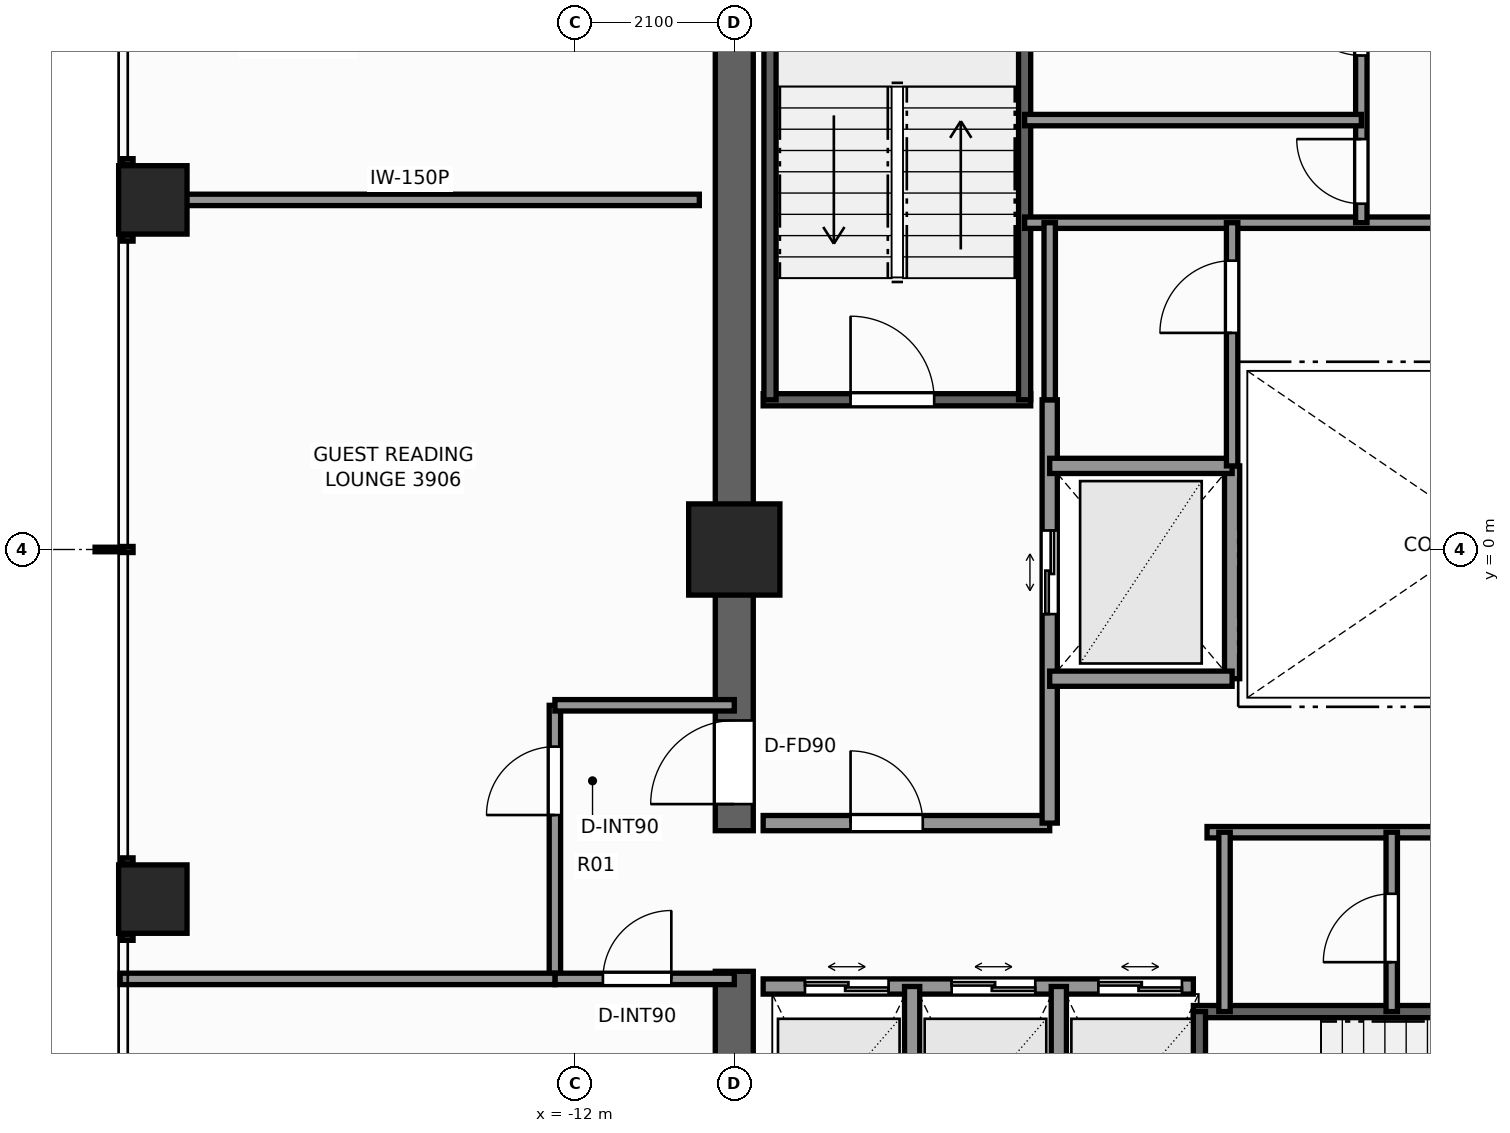
"""IFC4 building model, lengths in metres.
Left out: names, types, materials, properties, quantities, classifications, styles, units other than length and angle.
Written with IfcOpenShell. Run it as: python <this file> out.ifc"""

import sys

from ifc_helpers import new_model, si_unit, direction, frame, frame_2d, origin, origin_2d, place, context, subcontext, project, spatial, rectangle, extrude, element, fill, save


model = new_model("IFC4")
c1 = context("Model", 3, precision=1e-05, world=origin(), true_north=direction((0.0, 1.0)))
c2 = subcontext(c1, "Body", "Model", "MODEL_VIEW")
j1 = project(units=[si_unit("LENGTHUNIT", "METRE"), si_unit("PLANEANGLEUNIT", "RADIAN")], contexts=[c1])
p1 = place(None, origin())
s1 = spatial("IfcSite", under=j1, at=p1, CompositionType="ELEMENT")
p2 = place(p1, origin())
s2 = spatial("IfcBuilding", under=s1, at=p2, CompositionType="ELEMENT")
p3 = place(p2, frame((0.0, 0.0, 134.9)))
s3 = spatial("IfcBuildingStorey", under=s2, at=p3, CompositionType="ELEMENT", Elevation=134.9)
p4 = place(p3, frame((-9.9, -9.65, 0.0), z_axis=(0.0, 0.0, 1.0), x_axis=(0.0, 1.0, 0.0)))
e1 = element("IfcWall", 1, at=p4, inside=s3, PredefinedType="SHEAR", context=c2, shape_type="SweptSolid", body=[
    extrude(rectangle(XDim=4.1, YDim=0.5, at=frame_2d((2.05, 0.0))), origin(), (0.0, 0.0, 1.0), 3.3),
])
p5 = place(p3, frame((-9.9, -3.7, 0.0), z_axis=(0.0, 0.0, 1.0), x_axis=(0.0, 1.0, 0.0)))
e2 = element("IfcWall", 2, at=p5, inside=s3, PredefinedType="SHEAR", context=c2, shape_type="SweptSolid", body=[
    extrude(rectangle(XDim=13.35, YDim=0.5, at=frame_2d((6.675, 0.0))), origin(), (0.0, 0.0, 1.0), 3.3),
])
p6 = place(p5, frame((0.35, 0.0, 0.0)))
e3 = element("IfcOpeningElement", 3, at=p6, cuts=e2, PredefinedType="OPENING", context=c2, shape_type="SweptSolid", body=[
    extrude(rectangle(XDim=1.1, YDim=2.2, at=frame_2d((0.55, 1.1))), frame((0.0, 0.26, 0.0), z_axis=(0.0, -1.0, 0.0), x_axis=(1.0, 0.0, 0.0)), (0.0, 0.0, 1.0), 0.52),
])
p7 = place(p3, frame((-9.9, 0.0, 0.0), z_axis=(0.0, 0.0, 1.0), x_axis=(1.0, 0.0, 0.0)))
e4 = element("IfcColumn", 4, at=p7, inside=s3, PredefinedType="COLUMN", context=c2, shape_type="SweptSolid", body=[
    extrude(rectangle(XDim=1.2, YDim=1.2, at=origin_2d()), origin(), (0.0, 0.0, 1.0), 3.3),
])
for number, where, z_axis, x_axis in (
    (5, (-17.55, -4.6, 0.0), (0.0, 0.0, 1.0), (1.0, 0.0, 0.0)),
    (6, (-17.55, 4.6, 0.0), (0.0, 0.0, 1.0), (1.0, 0.0, 0.0)),
):
    element("IfcColumn", number, at=place(p3, frame(where, z_axis=z_axis, x_axis=x_axis)), inside=s3, PredefinedType="COLUMN", context=c2, shape_type="SweptSolid", body=[
        extrude(rectangle(XDim=0.9, YDim=0.9, at=origin_2d()), origin(), (0.0, 0.0, 1.0), 3.3),
    ])
p8 = place(p3, frame((-9.52, 1.97, 0.0), z_axis=(0.0, 0.0, 1.0), x_axis=(1.0, 0.0, 0.0)))
e7 = element("IfcWall", 7, at=p8, inside=s3, PredefinedType="SHEAR", context=c2, shape_type="SweptSolid", body=[
    extrude(rectangle(XDim=3.52, YDim=0.16, at=frame_2d((1.76, 0.0))), origin(), (0.0, 0.0, 1.0), 3.3),
])
p9 = place(p8, frame((1.15, 0.0, 0.0)))
e8 = element("IfcOpeningElement", 8, at=p9, cuts=e7, PredefinedType="OPENING", context=c2, shape_type="SweptSolid", body=[
    extrude(rectangle(XDim=1.1, YDim=2.2, at=frame_2d((0.55, 1.1))), frame((0.0, 0.09, 0.0), z_axis=(0.0, -1.0, 0.0), x_axis=(1.0, 0.0, 0.0)), (0.0, 0.0, 1.0), 0.18),
])
for number, where, z_axis, x_axis in (
    (9, (-9.43, 1.97, 0.0), (0.0, 0.0, 1.0), (0.0, 1.0, 0.0)),
    (10, (-6.08, 1.97, 0.0), (0.0, 0.0, 1.0), (0.0, 1.0, 0.0)),
):
    element("IfcWall", number, at=place(p3, frame(where, z_axis=z_axis, x_axis=x_axis)), inside=s3, PredefinedType="SHEAR", context=c2, shape_type="SweptSolid", body=[
        extrude(rectangle(XDim=7.56, YDim=0.16, at=frame_2d((3.78, 0.0))), origin(), (0.0, 0.0, 1.0), 3.3),
    ])
p10 = place(p3, frame((-3.86, -6.08, 0.0), z_axis=(0.0, 0.0, 1.0), x_axis=(1.0, 0.0, 0.0)))
e11 = element("IfcWall", 11, at=p10, inside=s3, PredefinedType="SHEAR", context=c2, shape_type="SweptSolid", body=[
    extrude(rectangle(XDim=7.72, YDim=0.16, at=frame_2d((3.86, 0.0))), origin(), (0.0, 0.0, 1.0), 3.3),
])
p11 = place(p3, frame((-3.78, -9.43, 0.0), z_axis=(0.0, 0.0, 1.0), x_axis=(0.0, 1.0, 0.0)))
e12 = element("IfcWall", 12, at=p11, inside=s3, PredefinedType="SHEAR", context=c2, shape_type="SweptSolid", body=[
    extrude(rectangle(XDim=3.35, YDim=0.16, at=frame_2d((1.675, 0.0))), origin(), (0.0, 0.0, 1.0), 3.3),
])
p12 = place(p3, frame((-9.52, -3.6, 0.0), z_axis=(0.0, 0.0, 1.0), x_axis=(1.0, 0.0, 0.0)))
e13 = element("IfcWall", 13, at=p12, inside=s3, PredefinedType="SOLIDWALL", context=c2, shape_type="SweptSolid", body=[
    extrude(rectangle(XDim=3.77, YDim=0.2, at=frame_2d((1.885, 0.0))), origin(), (0.0, 0.0, 1.0), 3.1),
])
p13 = place(p12, frame((1.15, 0.0, 0.0)))
e14 = element("IfcOpeningElement", 14, at=p13, cuts=e13, PredefinedType="OPENING", context=c2, shape_type="SweptSolid", body=[
    extrude(rectangle(XDim=0.95, YDim=2.06, at=frame_2d((0.475, 1.03))), frame((0.0, 0.11, 0.0), z_axis=(0.0, -1.0, 0.0), x_axis=(1.0, 0.0, 0.0)), (0.0, 0.0, 1.0), 0.22),
])
p14 = place(p3, frame((-5.75, -3.6, 0.0), z_axis=(0.0, 0.0, 1.0), x_axis=(0.0, 1.0, 0.0)))
e15 = element("IfcWall", 15, at=p14, inside=s3, PredefinedType="SOLIDWALL", context=c2, shape_type="SweptSolid", body=[
    extrude(rectangle(XDim=5.57, YDim=0.2, at=frame_2d((2.785, 0.0))), origin(), (0.0, 0.0, 1.0), 2.735),
])
p15 = place(p14, frame((2.75, 0.0, 0.0)))
e16 = element("IfcOpeningElement", 16, at=p15, cuts=e15, PredefinedType="OPENING", context=c2, shape_type="SweptSolid", body=[
    extrude(rectangle(XDim=1.1, YDim=2.2, at=frame_2d((0.55, 1.1))), frame((0.0, 0.11, 0.0), z_axis=(0.0, -1.0, 0.0), x_axis=(1.0, 0.0, 0.0)), (0.0, 0.0, 1.0), 0.22),
])
p16 = place(p3, frame((-3.35, -1.7, 0.0), z_axis=(0.0, 0.0, 1.0), x_axis=(0.0, 1.0, 0.0)))
e17 = element("IfcWall", 17, at=p16, inside=s3, PredefinedType="SOLIDWALL", context=c2, shape_type="SweptSolid", body=[
    extrude(rectangle(XDim=2.8, YDim=0.2, at=frame_2d((1.4, 0.0))), origin(), (0.0, 0.0, 1.0), 2.735),
])
for number, where, z_axis, x_axis in (
    (18, (-5.75, -1.7, 0.0), (0.0, 0.0, 1.0), (1.0, 0.0, 0.0)),
    (19, (-5.75, 1.1, 0.0), (0.0, 0.0, 1.0), (1.0, 0.0, 0.0)),
):
    element("IfcWall", number, at=place(p3, frame(where, z_axis=z_axis, x_axis=x_axis)), inside=s3, PredefinedType="SOLIDWALL", context=c2, shape_type="SweptSolid", body=[
        extrude(rectangle(XDim=2.4, YDim=0.2, at=frame_2d((1.2, 0.0))), origin(), (0.0, 0.0, 1.0), 3.1),
    ])
p17 = place(p3, frame((-6.08, 4.3, 0.0), z_axis=(0.0, 0.0, 1.0), x_axis=(1.0, 0.0, 0.0)))
e20 = element("IfcWall", 20, at=p17, inside=s3, PredefinedType="PARTITIONING", context=c2, shape_type="SweptSolid", body=[
    extrude(rectangle(XDim=6.3, YDim=0.15, at=frame_2d((3.15, 0.0))), origin(), (0.0, 0.0, 1.0), 3.1),
])
p18 = place(p3, frame((-1.65, 4.3, 0.0), z_axis=(0.0, 0.0, 1.0), x_axis=(0.0, 1.0, 0.0)))
e21 = element("IfcWall", 21, at=p18, inside=s3, PredefinedType="PARTITIONING", context=c2, shape_type="SweptSolid", body=[
    extrude(rectangle(XDim=5.22, YDim=0.15, at=frame_2d((2.61, 0.0))), origin(), (0.0, 0.0, 1.0), 3.1),
])
p19 = place(p18, frame((2.2, 0.0, 0.0)))
e22 = element("IfcOpeningElement", 22, at=p19, cuts=e21, PredefinedType="OPENING", context=c2, shape_type="SweptSolid", body=[
    extrude(rectangle(XDim=0.85, YDim=2.03, at=frame_2d((0.425, 1.015))), frame((0.0, 0.085, 0.0), z_axis=(0.0, -1.0, 0.0), x_axis=(1.0, 0.0, 0.0)), (0.0, 0.0, 1.0), 0.17),
])
p20 = place(p18, frame((0.25, 0.0, 0.0)))
e23 = element("IfcOpeningElement", 23, at=p20, cuts=e21, PredefinedType="OPENING", context=c2, shape_type="SweptSolid", body=[
    extrude(rectangle(XDim=0.85, YDim=2.03, at=frame_2d((0.425, 1.015))), frame((0.0, 0.085, 0.0), z_axis=(0.0, -1.0, 0.0), x_axis=(1.0, 0.0, 0.0)), (0.0, 0.0, 1.0), 0.17),
])
p21 = place(p3, frame((-6.08, 5.65, 0.0), z_axis=(0.0, 0.0, 1.0), x_axis=(1.0, 0.0, 0.0)))
e24 = element("IfcWall", 24, at=p21, inside=s3, PredefinedType="PARTITIONING", context=c2, shape_type="SweptSolid", body=[
    extrude(rectangle(XDim=4.43, YDim=0.15, at=frame_2d((2.215, 0.0))), origin(), (0.0, 0.0, 1.0), 3.1),
])
p22 = place(p3, frame((-9.52, -5.75, 0.0), z_axis=(0.0, 0.0, 1.0), x_axis=(1.0, 0.0, 0.0)))
e25 = element("IfcWall", 25, at=p22, inside=s3, PredefinedType="SOLIDWALL", context=c2, shape_type="SweptSolid", body=[
    extrude(rectangle(XDim=5.66, YDim=0.2, at=frame_2d((2.83, 0.0))), origin(), (0.0, 0.0, 1.0), 3.1),
])
p23 = place(p22, frame((0.55, 0.0, 0.0)))
e26 = element("IfcOpeningElement", 26, at=p23, cuts=e25, PredefinedType="OPENING", context=c2, shape_type="SweptSolid", body=[
    extrude(rectangle(XDim=1.1, YDim=2.2, at=frame_2d((0.55, 1.1))), frame((0.0, 0.11, 0.0), z_axis=(0.0, -1.0, 0.0), x_axis=(1.0, 0.0, 0.0)), (0.0, 0.0, 1.0), 0.22),
])
p24 = place(p22, frame((2.48, 0.0, 0.0)))
e27 = element("IfcOpeningElement", 27, at=p24, cuts=e25, PredefinedType="OPENING", context=c2, shape_type="SweptSolid", body=[
    extrude(rectangle(XDim=1.1, YDim=2.2, at=frame_2d((0.55, 1.1))), frame((0.0, 0.11, 0.0), z_axis=(0.0, -1.0, 0.0), x_axis=(1.0, 0.0, 0.0)), (0.0, 0.0, 1.0), 0.22),
])
p25 = place(p22, frame((4.41, 0.0, 0.0)))
e28 = element("IfcOpeningElement", 28, at=p25, cuts=e25, PredefinedType="OPENING", context=c2, shape_type="SweptSolid", body=[
    extrude(rectangle(XDim=1.1, YDim=2.2, at=frame_2d((0.55, 1.1))), frame((0.0, 0.11, 0.0), z_axis=(0.0, -1.0, 0.0), x_axis=(1.0, 0.0, 0.0)), (0.0, 0.0, 1.0), 0.22),
])
for number, where, z_axis, x_axis in (
    (29, (-7.56, -9.52, 0.0), (0.0, 0.0, 1.0), (0.0, 1.0, 0.0)),
    (30, (-5.63, -9.52, 0.0), (0.0, 0.0, 1.0), (0.0, 1.0, 0.0)),
):
    element("IfcWall", number, at=place(p3, frame(where, z_axis=z_axis, x_axis=x_axis)), inside=s3, PredefinedType="SOLIDWALL", context=c2, shape_type="SweptSolid", body=[
        extrude(rectangle(XDim=3.77, YDim=0.2, at=frame_2d((1.885, 0.0))), origin(), (0.0, 0.0, 1.0), 3.1),
    ])
p26 = place(p3, frame((-3.68, -3.72, 0.0), z_axis=(0.0, 0.0, 1.0), x_axis=(1.0, 0.0, 0.0)))
e31 = element("IfcWall", 31, at=p26, inside=s3, PredefinedType="PARTITIONING", context=c2, shape_type="SweptSolid", body=[
    extrude(rectangle(XDim=7.36, YDim=0.15, at=frame_2d((3.68, 0.0))), origin(), (0.0, 0.0, 1.0), 3.1),
])
p27 = place(p3, frame((-3.45, -6.08, 0.0), z_axis=(0.0, 0.0, 1.0), x_axis=(0.0, 1.0, 0.0)))
e32 = element("IfcWall", 32, at=p27, inside=s3, PredefinedType="PARTITIONING", context=c2, shape_type="SweptSolid", body=[
    extrude(rectangle(XDim=2.36, YDim=0.15, at=frame_2d((1.18, 0.0))), origin(), (0.0, 0.0, 1.0), 3.1),
])
p28 = place(p3, frame((-1.25, -6.08, 0.0), z_axis=(0.0, 0.0, 1.0), x_axis=(0.0, 1.0, 0.0)))
e33 = element("IfcWall", 33, at=p28, inside=s3, PredefinedType="PARTITIONING", context=c2, shape_type="SweptSolid", body=[
    extrude(rectangle(XDim=2.36, YDim=0.15, at=frame_2d((1.18, 0.0))), origin(), (0.0, 0.0, 1.0), 3.1),
])
p29 = place(p28, frame((0.65, 0.0, 0.0)))
e34 = element("IfcOpeningElement", 34, at=p29, cuts=e33, PredefinedType="OPENING", context=c2, shape_type="SweptSolid", body=[
    extrude(rectangle(XDim=0.9, YDim=2.06, at=frame_2d((0.45, 1.03))), frame((0.0, 0.085, 0.0), z_axis=(0.0, -1.0, 0.0), x_axis=(1.0, 0.0, 0.0)), (0.0, 0.0, 1.0), 0.17),
])
p30 = place(p3, frame((-3.35, 1.1, 0.0), z_axis=(0.0, 0.0, 1.0), x_axis=(0.0, 1.0, 0.0)))
e35 = element("IfcWall", 35, at=p30, inside=s3, PredefinedType="PARTITIONING", context=c2, shape_type="SweptSolid", body=[
    extrude(rectangle(XDim=3.2, YDim=0.15, at=frame_2d((1.6, 0.0))), origin(), (0.0, 0.0, 1.0), 2.735),
])
p31 = place(p30, frame((1.75, 0.0, 0.0)))
e36 = element("IfcOpeningElement", 36, at=p31, cuts=e35, PredefinedType="OPENING", context=c2, shape_type="SweptSolid", body=[
    extrude(rectangle(XDim=0.95, YDim=2.06, at=frame_2d((0.475, 1.03))), frame((0.0, 0.085, 0.0), z_axis=(0.0, -1.0, 0.0), x_axis=(1.0, 0.0, 0.0)), (0.0, 0.0, 1.0), 0.17),
])
p32 = place(p3, frame((-5.75, 1.97, 0.0), z_axis=(0.0, 0.0, 1.0), x_axis=(0.0, 1.0, 0.0)))
e37 = element("IfcWall", 37, at=p32, inside=s3, PredefinedType="PARTITIONING", context=c2, shape_type="SweptSolid", body=[
    extrude(rectangle(XDim=2.33, YDim=0.15, at=frame_2d((1.165, 0.0))), origin(), (0.0, 0.0, 1.0), 2.735),
])
p33 = place(p3, frame((-12.26, -5.65, 0.0), z_axis=(0.0, 0.0, 1.0), x_axis=(0.0, 1.0, 0.0)))
e38 = element("IfcWall", 38, at=p33, inside=s3, PredefinedType="PARTITIONING", context=c2, shape_type="SweptSolid", body=[
    extrude(rectangle(XDim=3.6, YDim=0.15, at=frame_2d((1.8, 0.0))), origin(), (0.0, 0.0, 1.0), 2.312),
])
p34 = place(p33, frame((2.156, 0.0, 0.0)))
e39 = element("IfcOpeningElement", 39, at=p34, cuts=e38, PredefinedType="OPENING", context=c2, shape_type="SweptSolid", body=[
    extrude(rectangle(XDim=0.9, YDim=2.06, at=frame_2d((0.45, 1.03))), frame((0.0, 0.085, 0.0), z_axis=(0.0, -1.0, 0.0), x_axis=(1.0, 0.0, 0.0)), (0.0, 0.0, 1.0), 0.17),
])
p35 = place(p3, frame((-12.26, -2.05, 0.0), z_axis=(0.0, 0.0, 1.0), x_axis=(1.0, 0.0, 0.0)))
e40 = element("IfcWall", 40, at=p35, inside=s3, PredefinedType="PARTITIONING", context=c2, shape_type="SweptSolid", body=[
    extrude(rectangle(XDim=2.36, YDim=0.15, at=frame_2d((1.18, 0.0))), origin(), (0.0, 0.0, 1.0), 3.1),
])
p36 = place(p3, frame((-12.26, -5.65, 0.0), z_axis=(0.0, 0.0, 1.0), x_axis=(1.0, 0.0, 0.0)))
e41 = element("IfcWall", 41, at=p36, inside=s3, PredefinedType="PARTITIONING", context=c2, shape_type="SweptSolid", body=[
    extrude(rectangle(XDim=2.36, YDim=0.15, at=frame_2d((1.18, 0.0))), origin(), (0.0, 0.0, 1.0), 3.1),
])
p37 = place(p36, frame((0.632, 0.0, 0.0)))
e42 = element("IfcOpeningElement", 42, at=p37, cuts=e41, PredefinedType="OPENING", context=c2, shape_type="SweptSolid", body=[
    extrude(rectangle(XDim=0.9, YDim=2.06, at=frame_2d((0.45, 1.03))), frame((0.0, 0.085, 0.0), z_axis=(0.0, -1.0, 0.0), x_axis=(1.0, 0.0, 0.0)), (0.0, 0.0, 1.0), 0.17),
])
p38 = place(p3, frame((-17.98, 4.6, 0.0), z_axis=(0.0, 0.0, 1.0), x_axis=(1.0, 0.0, 0.0)))
e43 = element("IfcWall", 43, at=p38, inside=s3, PredefinedType="PARTITIONING", context=c2, shape_type="SweptSolid", body=[
    extrude(rectangle(XDim=7.62, YDim=0.15, at=frame_2d((3.81, 0.0))), origin(), (0.0, 0.0, 1.0), 2.312),
])
p39 = place(p3, frame((-17.98, -5.65, 0.0), z_axis=(0.0, 0.0, 1.0), x_axis=(1.0, 0.0, 0.0)))
e44 = element("IfcWall", 44, at=p39, inside=s3, PredefinedType="PARTITIONING", context=c2, shape_type="SweptSolid", body=[
    extrude(rectangle(XDim=5.72, YDim=0.15, at=frame_2d((2.86, 0.0))), origin(), (0.0, 0.0, 1.0), 2.469),
])
p40 = place(p9, origin())
e45 = element("IfcDoor", 45, at=p40, inside=s3, OperationType="SINGLE_SWING_LEFT", PredefinedType="DOOR", context=c2, shape_type="SweptSolid", body=[
    extrude(rectangle(XDim=1.1, YDim=2.2, at=frame_2d((0.55, 1.1))), frame((0.0, 0.025, 0.0), z_axis=(0.0, -1.0, 0.0), x_axis=(1.0, 0.0, 0.0)), (0.0, 0.0, 1.0), 0.05),
])
fill(e8, e45)
p41 = place(p6, origin())
e46 = element("IfcDoor", 46, at=p41, inside=s3, OperationType="SINGLE_SWING_LEFT", PredefinedType="DOOR", context=c2, shape_type="SweptSolid", body=[
    extrude(rectangle(XDim=1.1, YDim=2.2, at=frame_2d((0.55, 1.1))), frame((0.0, 0.025, 0.0), z_axis=(0.0, -1.0, 0.0), x_axis=(1.0, 0.0, 0.0)), (0.0, 0.0, 1.0), 0.05),
])
fill(e3, e46)
p42 = place(p15, origin())
e47 = element("IfcDoor", 47, at=p42, inside=s3, OperationType="DOUBLE_DOOR_SLIDING", PredefinedType="DOOR", context=c2, shape_type="SweptSolid", body=[
    extrude(rectangle(XDim=1.1, YDim=2.2, at=frame_2d((0.55, 1.1))), frame((0.0, 0.025, 0.0), z_axis=(0.0, -1.0, 0.0), x_axis=(1.0, 0.0, 0.0)), (0.0, 0.0, 1.0), 0.05),
])
fill(e16, e47)
p43 = place(p19, origin())
e48 = element("IfcDoor", 48, at=p43, inside=s3, OperationType="SINGLE_SWING_RIGHT", PredefinedType="DOOR", context=c2, shape_type="SweptSolid", body=[
    extrude(rectangle(XDim=0.85, YDim=2.03, at=frame_2d((0.425, 1.015))), frame((0.0, 0.025, 0.0), z_axis=(0.0, -1.0, 0.0), x_axis=(1.0, 0.0, 0.0)), (0.0, 0.0, 1.0), 0.05),
])
fill(e22, e48)
p44 = place(p20, origin())
e49 = element("IfcDoor", 49, at=p44, inside=s3, OperationType="SINGLE_SWING_RIGHT", PredefinedType="DOOR", context=c2, shape_type="SweptSolid", body=[
    extrude(rectangle(XDim=0.85, YDim=2.03, at=frame_2d((0.425, 1.015))), frame((0.0, 0.025, 0.0), z_axis=(0.0, -1.0, 0.0), x_axis=(1.0, 0.0, 0.0)), (0.0, 0.0, 1.0), 0.05),
])
fill(e23, e49)
p45 = place(p23, origin())
e50 = element("IfcDoor", 50, at=p45, inside=s3, OperationType="DOUBLE_DOOR_SLIDING", PredefinedType="DOOR", context=c2, shape_type="SweptSolid", body=[
    extrude(rectangle(XDim=1.1, YDim=2.2, at=frame_2d((0.55, 1.1))), frame((0.0, 0.025, 0.0), z_axis=(0.0, -1.0, 0.0), x_axis=(1.0, 0.0, 0.0)), (0.0, 0.0, 1.0), 0.05),
])
fill(e26, e50)
p46 = place(p24, origin())
e51 = element("IfcDoor", 51, at=p46, inside=s3, OperationType="DOUBLE_DOOR_SLIDING", PredefinedType="DOOR", context=c2, shape_type="SweptSolid", body=[
    extrude(rectangle(XDim=1.1, YDim=2.2, at=frame_2d((0.55, 1.1))), frame((0.0, 0.025, 0.0), z_axis=(0.0, -1.0, 0.0), x_axis=(1.0, 0.0, 0.0)), (0.0, 0.0, 1.0), 0.05),
])
fill(e27, e51)
p47 = place(p25, origin())
e52 = element("IfcDoor", 52, at=p47, inside=s3, OperationType="DOUBLE_DOOR_SLIDING", PredefinedType="DOOR", context=c2, shape_type="SweptSolid", body=[
    extrude(rectangle(XDim=1.1, YDim=2.2, at=frame_2d((0.55, 1.1))), frame((0.0, 0.025, 0.0), z_axis=(0.0, -1.0, 0.0), x_axis=(1.0, 0.0, 0.0)), (0.0, 0.0, 1.0), 0.05),
])
fill(e28, e52)
p48 = place(p13, origin())
e53 = element("IfcDoor", 53, at=p48, inside=s3, OperationType="SINGLE_SWING_LEFT", PredefinedType="DOOR", context=c2, shape_type="SweptSolid", body=[
    extrude(rectangle(XDim=0.95, YDim=2.06, at=frame_2d((0.475, 1.03))), frame((0.0, 0.025, 0.0), z_axis=(0.0, -1.0, 0.0), x_axis=(1.0, 0.0, 0.0)), (0.0, 0.0, 1.0), 0.05),
])
fill(e14, e53)
p49 = place(p29, origin())
e54 = element("IfcDoor", 54, at=p49, inside=s3, OperationType="SINGLE_SWING_LEFT", PredefinedType="DOOR", context=c2, shape_type="SweptSolid", body=[
    extrude(rectangle(XDim=0.9, YDim=2.06, at=frame_2d((0.45, 1.03))), frame((0.0, 0.025, 0.0), z_axis=(0.0, -1.0, 0.0), x_axis=(1.0, 0.0, 0.0)), (0.0, 0.0, 1.0), 0.05),
])
fill(e34, e54)
p50 = place(p31, origin())
e55 = element("IfcDoor", 55, at=p50, inside=s3, OperationType="SINGLE_SWING_LEFT", PredefinedType="DOOR", context=c2, shape_type="SweptSolid", body=[
    extrude(rectangle(XDim=0.95, YDim=2.06, at=frame_2d((0.475, 1.03))), frame((0.0, 0.025, 0.0), z_axis=(0.0, -1.0, 0.0), x_axis=(1.0, 0.0, 0.0)), (0.0, 0.0, 1.0), 0.05),
])
fill(e36, e55)
p51 = place(p34, origin())
e56 = element("IfcDoor", 56, at=p51, inside=s3, OperationType="SINGLE_SWING_LEFT", PredefinedType="DOOR", context=c2, shape_type="SweptSolid", body=[
    extrude(rectangle(XDim=0.9, YDim=2.06, at=frame_2d((0.45, 1.03))), frame((0.0, 0.025, 0.0), z_axis=(0.0, -1.0, 0.0), x_axis=(1.0, 0.0, 0.0)), (0.0, 0.0, 1.0), 0.05),
])
fill(e39, e56)
p52 = place(p37, origin())
e57 = element("IfcDoor", 57, at=p52, inside=s3, OperationType="SINGLE_SWING_RIGHT", PredefinedType="DOOR", context=c2, shape_type="SweptSolid", body=[
    extrude(rectangle(XDim=0.9, YDim=2.06, at=frame_2d((0.45, 1.03))), frame((0.0, 0.025, 0.0), z_axis=(0.0, -1.0, 0.0), x_axis=(1.0, 0.0, 0.0)), (0.0, 0.0, 1.0), 0.05),
])
fill(e42, e57)
save(model, sys.argv[1])
